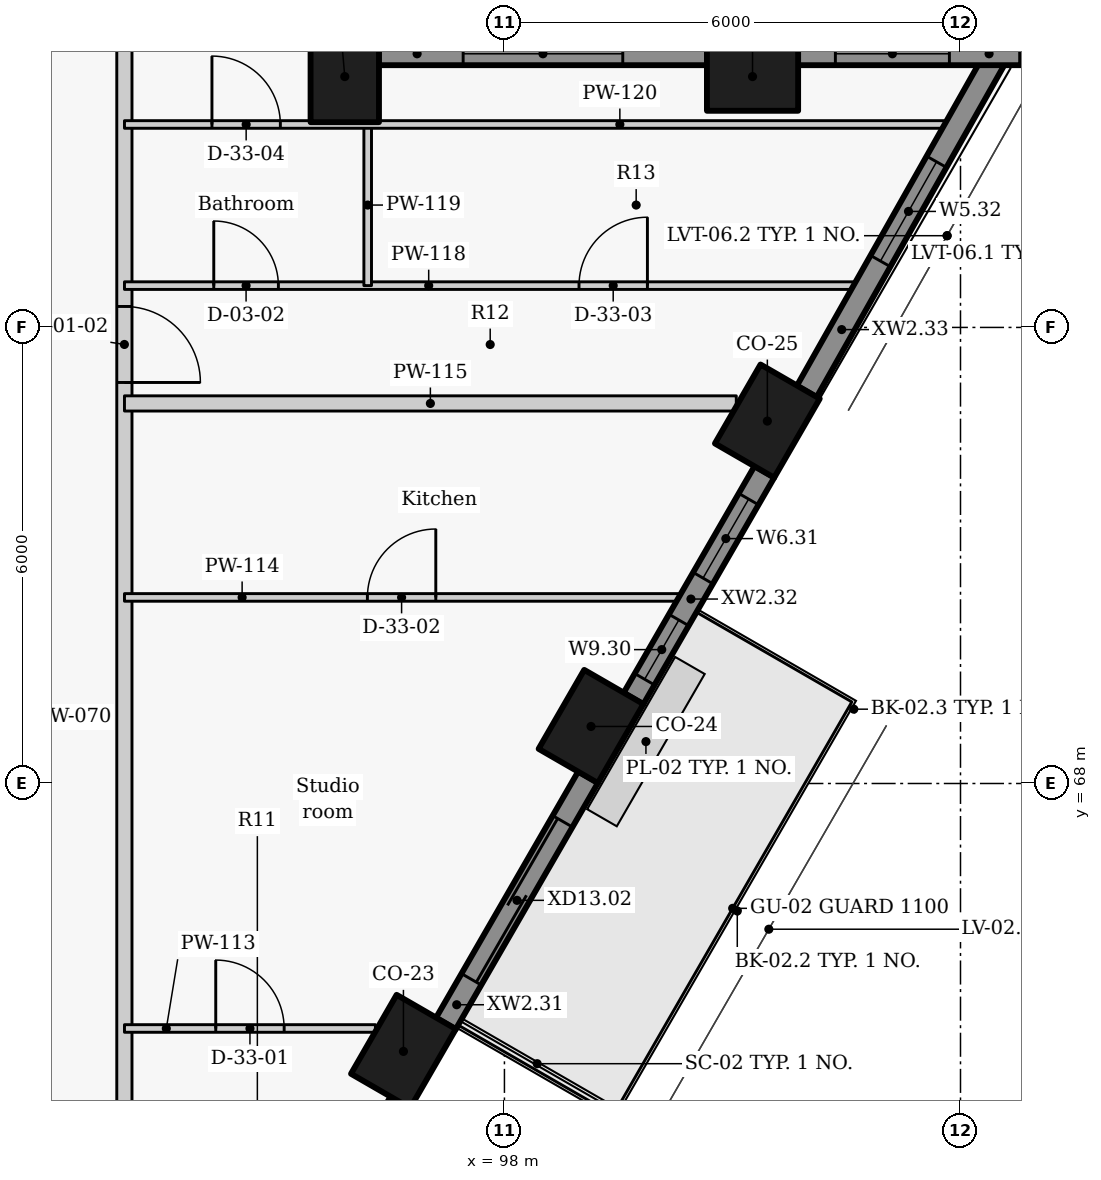
"""IFC4 building model, lengths in metres.
Left out: names, types, materials, properties, quantities, classifications, styles, units other than length and angle.
Written with IfcOpenShell. Run it as: python <this file> out.ifc"""

import sys

from ifc_helpers import new_model, si_unit, direction, frame, frame_2d, origin, origin_2d, place, context, subcontext, project, spatial, rectangle, extrude, element, fill, save


model = new_model("IFC4")
c1 = context("Model", 3, precision=1e-05, world=origin(), true_north=direction((0.0, 1.0)))
c2 = subcontext(c1, "Body", "Model", "MODEL_VIEW")
j1 = project(units=[si_unit("LENGTHUNIT", "METRE"), si_unit("PLANEANGLEUNIT", "RADIAN")], contexts=[c1])
p1 = place(None, origin())
s1 = spatial("IfcSite", under=j1, at=p1, CompositionType="ELEMENT")
p2 = place(p1, origin())
s2 = spatial("IfcBuilding", under=s1, at=p2, CompositionType="ELEMENT")
p3 = place(p2, frame((0.0, 0.0, 193.2)))
s3 = spatial("IfcBuildingStorey", under=s2, at=p3, CompositionType="ELEMENT", Elevation=193.2)
for number, where, z_axis, x_axis in (
    (1, (96.671, 64.475, 0.0), (0.0, 0.0, 1.0), (0.5, 0.866, 0.0)),
    (2, (99.139, 68.75, 0.0), (0.0, 0.0, 1.0), (0.5, 0.866, 0.0)),
    (3, (101.459, 72.768, 0.0), (0.0, 0.0, 1.0), (0.5, 0.866, 0.0)),
    (4, (101.264, 77.3, 0.0), (0.0, 0.0, 1.0), (-1.0, 0.0, 0.0)),
    (5, (95.899, 77.3, 0.0), (0.0, 0.0, 1.0), (0.0, 1.0, 0.0)),
):
    element("IfcColumn", number, at=place(p3, frame(where, z_axis=z_axis, x_axis=x_axis)), inside=s3, PredefinedType="COLUMN", context=c2, shape_type="SweptSolid", body=[
        extrude(rectangle(XDim=1.2, YDim=0.9, at=origin_2d()), origin(), (0.0, 0.0, 1.0), 3.3),
    ])
p4 = place(p3, frame((94.761, 60.567, 0.0), z_axis=(0.0, 0.0, 1.0), x_axis=(0.499982088007, 0.866035745032, 0.0)))
e6 = element("IfcWall", 6, at=p4, inside=s3, PredefinedType="SOLIDWALL", context=c2, shape_type="SweptSolid", body=[
    extrude(rectangle(XDim=3.744, YDim=0.3, at=frame_2d((1.872, 0.0))), origin(), (0.0, 0.0, 1.0), 2.425),
])
p5 = place(p4, frame((2.319, 0.0, 1.5)))
e7 = element("IfcOpeningElement", 7, at=p5, cuts=e6, PredefinedType="OPENING", context=c2, shape_type="SweptSolid", body=[
    extrude(rectangle(XDim=0.9, YDim=0.5, at=frame_2d((0.45, 0.25))), frame((0.0, 0.16, 0.0), z_axis=(0.0, -1.0, 0.0), x_axis=(1.0, 0.0, 0.0)), (0.0, 0.0, 1.0), 0.32),
])
p6 = place(p3, frame((97.229, 64.842, 0.0), z_axis=(0.0, 0.0, 1.0), x_axis=(0.500059225181, 0.86599120741, 0.0)))
e8 = element("IfcWall", 8, at=p6, inside=s3, PredefinedType="SOLIDWALL", context=c2, shape_type="SweptSolid", body=[
    extrude(rectangle(XDim=3.744, YDim=0.3, at=frame_2d((1.872, 0.0))), origin(), (0.0, 0.0, 1.0), 2.425),
])
p7 = place(p6, frame((0.672, 0.0, 0.0)))
e9 = element("IfcOpeningElement", 9, at=p7, cuts=e8, PredefinedType="OPENING", context=c2, shape_type="SweptSolid", body=[
    extrude(rectangle(XDim=2.4, YDim=2.0, at=frame_2d((1.2, 1.0))), frame((0.0, 0.16, 0.0), z_axis=(0.0, -1.0, 0.0), x_axis=(1.0, 0.0, 0.0)), (0.0, 0.0, 1.0), 0.32),
])
p8 = place(p3, frame((99.697, 69.116, 0.0), z_axis=(0.0, 0.0, 1.0), x_axis=(0.499955427682, 0.866051136095, 0.0)))
e10 = element("IfcWall", 10, at=p8, inside=s3, PredefinedType="SOLIDWALL", context=c2, shape_type="SweptSolid", body=[
    extrude(rectangle(XDim=3.447, YDim=0.3, at=frame_2d((1.724, 0.0))), origin(), (0.0, 0.0, 1.0), 2.425),
])
p9 = place(p8, frame((0.295, 0.0, 0.9)))
e11 = element("IfcOpeningElement", 11, at=p9, cuts=e10, PredefinedType="OPENING", context=c2, shape_type="SweptSolid", body=[
    extrude(rectangle(XDim=0.9, YDim=1.1, at=frame_2d((0.45, 0.55))), frame((0.0, 0.16, 0.0), z_axis=(0.0, -1.0, 0.0), x_axis=(1.0, 0.0, 0.0)), (0.0, 0.0, 1.0), 0.32),
])
p10 = place(p8, frame((1.831, 0.0, 0.9)))
e12 = element("IfcOpeningElement", 12, at=p10, cuts=e10, PredefinedType="OPENING", context=c2, shape_type="SweptSolid", body=[
    extrude(rectangle(XDim=1.2, YDim=1.1, at=frame_2d((0.6, 0.55))), frame((0.0, 0.16, 0.0), z_axis=(0.0, -1.0, 0.0), x_axis=(1.0, 0.0, 0.0)), (0.0, 0.0, 1.0), 0.32),
])
p11 = place(p3, frame((101.977, 73.157, 0.0), z_axis=(0.0, 0.0, 1.0), x_axis=(0.492033360928, 0.870576344575, 0.0)))
e13 = element("IfcWall", 13, at=p11, inside=s3, PredefinedType="SOLIDWALL", context=c2, shape_type="SweptSolid", body=[
    extrude(rectangle(XDim=5.387, YDim=0.3, at=frame_2d((2.693, 0.0))), origin(), (0.0, 0.0, 1.0), 2.425),
])
p12 = place(p11, frame((1.971, 0.0, 0.9)))
e14 = element("IfcOpeningElement", 14, at=p12, cuts=e13, PredefinedType="OPENING", context=c2, shape_type="SweptSolid", body=[
    extrude(rectangle(XDim=1.5, YDim=1.1, at=frame_2d((0.75, 0.55))), frame((0.0, 0.16, 0.0), z_axis=(0.0, -1.0, 0.0), x_axis=(1.0, 0.0, 0.0)), (0.0, 0.0, 1.0), 0.32),
])
p13 = place(p3, frame((104.798, 77.6, 0.0), z_axis=(0.0, 0.0, 1.0), x_axis=(-1.0, 0.0, 0.0)))
e15 = element("IfcWall", 15, at=p13, inside=s3, PredefinedType="SOLIDWALL", context=c2, shape_type="SweptSolid", body=[
    extrude(rectangle(XDim=2.938, YDim=0.3, at=frame_2d((1.469, 0.0))), origin(), (0.0, 0.0, 1.0), 2.425),
])
p14 = place(p13, frame((0.944, 0.0, 0.9)))
e16 = element("IfcOpeningElement", 16, at=p14, cuts=e15, PredefinedType="OPENING", context=c2, shape_type="SweptSolid", body=[
    extrude(rectangle(XDim=1.5, YDim=1.1, at=frame_2d((0.75, 0.55))), frame((0.0, 0.16, 0.0), z_axis=(0.0, -1.0, 0.0), x_axis=(1.0, 0.0, 0.0)), (0.0, 0.0, 1.0), 0.32),
])
p15 = place(p3, frame((100.668, 77.6, 0.0), z_axis=(0.0, 0.0, 1.0), x_axis=(-1.0, 0.0, 0.0)))
e17 = element("IfcWall", 17, at=p15, inside=s3, PredefinedType="SOLIDWALL", context=c2, shape_type="SweptSolid", body=[
    extrude(rectangle(XDim=4.323, YDim=0.3, at=frame_2d((2.161, 0.0))), origin(), (0.0, 0.0, 1.0), 2.425),
])
p16 = place(p15, frame((1.111, 0.0, 0.9)))
e18 = element("IfcOpeningElement", 18, at=p16, cuts=e17, PredefinedType="OPENING", context=c2, shape_type="SweptSolid", body=[
    extrude(rectangle(XDim=2.1, YDim=1.1, at=frame_2d((1.05, 0.55))), frame((0.0, 0.16, 0.0), z_axis=(0.0, -1.0, 0.0), x_axis=(1.0, 0.0, 0.0)), (0.0, 0.0, 1.0), 0.32),
])
p17 = place(p3, frame((93.0, 101.281, 0.0), z_axis=(0.0, 0.0, 1.0), x_axis=(0.0, -1.0, 0.0)))
e19 = element("IfcWall", 19, at=p17, inside=s3, PredefinedType="PARTITIONING", context=c2, shape_type="SweptSolid", body=[
    extrude(rectangle(XDim=42.606, YDim=0.2, at=frame_2d((21.303, 0.0))), origin(), (0.0, 0.0, 1.0), 2.405),
])
p18 = place(p17, frame((39.33, 0.0, 0.0)))
e20 = element("IfcOpeningElement", 20, at=p18, cuts=e19, PredefinedType="OPENING", context=c2, shape_type="SweptSolid", body=[
    extrude(rectangle(XDim=1.0, YDim=2.1, at=frame_2d((0.5, 1.05))), frame((0.0, 0.11, 0.0), z_axis=(0.0, -1.0, 0.0), x_axis=(1.0, 0.0, 0.0)), (0.0, 0.0, 1.0), 0.22),
])
p19 = place(p17, frame((27.005, 0.0, 0.0)))
e21 = element("IfcOpeningElement", 21, at=p19, cuts=e19, PredefinedType="OPENING", context=c2, shape_type="SweptSolid", body=[
    extrude(rectangle(XDim=1.0, YDim=2.1, at=frame_2d((0.5, 1.05))), frame((0.0, 0.11, 0.0), z_axis=(0.0, -1.0, 0.0), x_axis=(1.0, 0.0, 0.0)), (0.0, 0.0, 1.0), 0.22),
])
p20 = place(p17, frame((9.168, 0.0, 0.0)))
e22 = element("IfcOpeningElement", 22, at=p20, cuts=e19, PredefinedType="OPENING", context=c2, shape_type="SweptSolid", body=[
    extrude(rectangle(XDim=1.0, YDim=2.1, at=frame_2d((0.5, 1.05))), frame((0.0, 0.11, 0.0), z_axis=(0.0, -1.0, 0.0), x_axis=(1.0, 0.0, 0.0)), (0.0, 0.0, 1.0), 0.22),
])
p21 = place(p17, frame((3.937, 0.0, 0.0)))
e23 = element("IfcOpeningElement", 23, at=p21, cuts=e19, PredefinedType="OPENING", context=c2, shape_type="SweptSolid", body=[
    extrude(rectangle(XDim=1.0, YDim=2.1, at=frame_2d((0.5, 1.05))), frame((0.0, 0.11, 0.0), z_axis=(0.0, -1.0, 0.0), x_axis=(1.0, 0.0, 0.0)), (0.0, 0.0, 1.0), 0.22),
])
p22 = place(p3, frame((93.001, 64.777, 0.0), z_axis=(0.0, 0.0, 1.0), x_axis=(1.0, 0.0, 0.0)))
e24 = element("IfcWall", 24, at=p22, inside=s3, PredefinedType="PARTITIONING", context=c2, shape_type="SweptSolid", body=[
    extrude(rectangle(XDim=3.302, YDim=0.1, at=frame_2d((1.651, 0.0))), origin(), (0.0, 0.0, 1.0), 3.025),
])
p23 = place(p22, frame((1.201, 0.0, 0.0)))
e25 = element("IfcOpeningElement", 25, at=p23, cuts=e24, PredefinedType="OPENING", context=c2, shape_type="SweptSolid", body=[
    extrude(rectangle(XDim=0.9, YDim=2.1, at=frame_2d((0.45, 1.05))), frame((0.0, 0.06, 0.0), z_axis=(0.0, -1.0, 0.0), x_axis=(1.0, 0.0, 0.0)), (0.0, 0.0, 1.0), 0.12),
])
p24 = place(p3, frame((93.001, 70.448, 0.0), z_axis=(0.0, 0.0, 1.0), x_axis=(1.0, 0.0, 0.0)))
e26 = element("IfcWall", 26, at=p24, inside=s3, PredefinedType="PARTITIONING", context=c2, shape_type="SweptSolid", body=[
    extrude(rectangle(XDim=7.292, YDim=0.1, at=frame_2d((3.646, 0.0))), origin(), (0.0, 0.0, 1.0), 2.405),
])
p25 = place(p24, frame((3.196, 0.0, 0.0)))
e27 = element("IfcOpeningElement", 27, at=p25, cuts=e26, PredefinedType="OPENING", context=c2, shape_type="SweptSolid", body=[
    extrude(rectangle(XDim=0.9, YDim=2.1, at=frame_2d((0.45, 1.05))), frame((0.0, 0.06, 0.0), z_axis=(0.0, -1.0, 0.0), x_axis=(1.0, 0.0, 0.0)), (0.0, 0.0, 1.0), 0.12),
])
p26 = place(p3, frame((93.001, 73.0, 0.0), z_axis=(0.0, 0.0, 1.0), x_axis=(1.0, 0.0, 0.0)))
e28 = element("IfcWall", 28, at=p26, inside=s3, PredefinedType="PARTITIONING", context=c2, shape_type="SweptSolid", body=[
    extrude(rectangle(XDim=8.049, YDim=0.2, at=frame_2d((4.025, 0.0))), origin(), (0.0, 0.0, 1.0), 3.025),
])
p27 = place(p3, frame((93.001, 74.55, 0.0), z_axis=(0.0, 0.0, 1.0), x_axis=(1.0, 0.0, 0.0)))
e29 = element("IfcWall", 29, at=p27, inside=s3, PredefinedType="PARTITIONING", context=c2, shape_type="SweptSolid", body=[
    extrude(rectangle(XDim=9.66, YDim=0.1, at=frame_2d((4.83, 0.0))), origin(), (0.0, 0.0, 1.0), 2.405),
])
p28 = place(p27, frame((1.175, 0.0, 0.0)))
e30 = element("IfcOpeningElement", 30, at=p28, cuts=e29, PredefinedType="OPENING", context=c2, shape_type="SweptSolid", body=[
    extrude(rectangle(XDim=0.85, YDim=2.1, at=frame_2d((0.425, 1.05))), frame((0.0, 0.06, 0.0), z_axis=(0.0, -1.0, 0.0), x_axis=(1.0, 0.0, 0.0)), (0.0, 0.0, 1.0), 0.12),
])
p29 = place(p27, frame((5.98, 0.0, 0.0)))
e31 = element("IfcOpeningElement", 31, at=p29, cuts=e29, PredefinedType="OPENING", context=c2, shape_type="SweptSolid", body=[
    extrude(rectangle(XDim=0.9, YDim=2.1, at=frame_2d((0.45, 1.05))), frame((0.0, 0.06, 0.0), z_axis=(0.0, -1.0, 0.0), x_axis=(1.0, 0.0, 0.0)), (0.0, 0.0, 1.0), 0.12),
])
p30 = place(p3, frame((96.201, 74.55, 0.0), z_axis=(0.0, 0.0, 1.0), x_axis=(0.0, 1.0, 0.0)))
e32 = element("IfcWall", 32, at=p30, inside=s3, PredefinedType="PARTITIONING", context=c2, shape_type="SweptSolid", body=[
    extrude(rectangle(XDim=2.12, YDim=0.1, at=frame_2d((1.06, 0.0))), origin(), (0.0, 0.0, 1.0), 3.025),
])
p31 = place(p3, frame((93.001, 76.67, 0.0), z_axis=(0.0, 0.0, 1.0), x_axis=(1.0, 0.0, 0.0)))
e33 = element("IfcWall", 33, at=p31, inside=s3, PredefinedType="PARTITIONING", context=c2, shape_type="SweptSolid", body=[
    extrude(rectangle(XDim=10.884, YDim=0.1, at=frame_2d((5.442, 0.0))), origin(), (0.0, 0.0, 1.0), 2.405),
])
p32 = place(p31, frame((1.151, 0.0, 0.0)))
e34 = element("IfcOpeningElement", 34, at=p32, cuts=e33, PredefinedType="OPENING", context=c2, shape_type="SweptSolid", body=[
    extrude(rectangle(XDim=0.9, YDim=2.1, at=frame_2d((0.45, 1.05))), frame((0.0, 0.06, 0.0), z_axis=(0.0, -1.0, 0.0), x_axis=(1.0, 0.0, 0.0)), (0.0, 0.0, 1.0), 0.12),
])
p33 = place(p7, origin())
e35 = element("IfcDoor", 35, at=p33, inside=s3, OperationType="DOUBLE_DOOR_SLIDING", PredefinedType="DOOR", context=c2, shape_type="SweptSolid", body=[
    extrude(rectangle(XDim=2.4, YDim=2.0, at=frame_2d((1.2, 1.0))), frame((0.0, 0.025, 0.0), z_axis=(0.0, -1.0, 0.0), x_axis=(1.0, 0.0, 0.0)), (0.0, 0.0, 1.0), 0.05),
])
fill(e9, e35)
p34 = place(p9, origin())
e36 = element("IfcWindow", 36, at=p34, inside=s3, PartitioningType="SINGLE_PANEL", PredefinedType="WINDOW", context=c2, shape_type="SweptSolid", body=[
    extrude(rectangle(XDim=0.9, YDim=1.1, at=frame_2d((0.45, 0.55))), frame((0.0, 0.03, 0.0), z_axis=(0.0, -1.0, 0.0), x_axis=(1.0, 0.0, 0.0)), (0.0, 0.0, 1.0), 0.06),
])
fill(e11, e36)
p35 = place(p10, origin())
e37 = element("IfcWindow", 37, at=p35, inside=s3, PartitioningType="SINGLE_PANEL", PredefinedType="WINDOW", context=c2, shape_type="SweptSolid", body=[
    extrude(rectangle(XDim=1.2, YDim=1.1, at=frame_2d((0.6, 0.55))), frame((0.0, 0.03, 0.0), z_axis=(0.0, -1.0, 0.0), x_axis=(1.0, 0.0, 0.0)), (0.0, 0.0, 1.0), 0.06),
])
fill(e12, e37)
p36 = place(p12, origin())
e38 = element("IfcWindow", 38, at=p36, inside=s3, PartitioningType="SINGLE_PANEL", PredefinedType="WINDOW", context=c2, shape_type="SweptSolid", body=[
    extrude(rectangle(XDim=1.5, YDim=1.1, at=frame_2d((0.75, 0.55))), frame((0.0, 0.03, 0.0), z_axis=(0.0, -1.0, 0.0), x_axis=(1.0, 0.0, 0.0)), (0.0, 0.0, 1.0), 0.06),
])
fill(e14, e38)
p37 = place(p14, origin())
e39 = element("IfcWindow", 39, at=p37, inside=s3, PartitioningType="SINGLE_PANEL", PredefinedType="WINDOW", context=c2, shape_type="SweptSolid", body=[
    extrude(rectangle(XDim=1.5, YDim=1.1, at=frame_2d((0.75, 0.55))), frame((0.0, 0.03, 0.0), z_axis=(0.0, -1.0, 0.0), x_axis=(1.0, 0.0, 0.0)), (0.0, 0.0, 1.0), 0.06),
])
fill(e16, e39)
p38 = place(p16, origin())
e40 = element("IfcWindow", 40, at=p38, inside=s3, PartitioningType="SINGLE_PANEL", PredefinedType="WINDOW", context=c2, shape_type="SweptSolid", body=[
    extrude(rectangle(XDim=2.1, YDim=1.1, at=frame_2d((1.05, 0.55))), frame((0.0, 0.03, 0.0), z_axis=(0.0, -1.0, 0.0), x_axis=(1.0, 0.0, 0.0)), (0.0, 0.0, 1.0), 0.06),
])
fill(e18, e40)
p39 = place(p23, origin())
e41 = element("IfcDoor", 41, at=p39, inside=s3, OperationType="SINGLE_SWING_LEFT", PredefinedType="DOOR", context=c2, shape_type="SweptSolid", body=[
    extrude(rectangle(XDim=0.9, YDim=2.1, at=frame_2d((0.45, 1.05))), frame((0.0, 0.025, 0.0), z_axis=(0.0, -1.0, 0.0), x_axis=(1.0, 0.0, 0.0)), (0.0, 0.0, 1.0), 0.05),
])
fill(e25, e41)
p40 = place(p25, origin())
e42 = element("IfcDoor", 42, at=p40, inside=s3, OperationType="SINGLE_SWING_RIGHT", PredefinedType="DOOR", context=c2, shape_type="SweptSolid", body=[
    extrude(rectangle(XDim=0.9, YDim=2.1, at=frame_2d((0.45, 1.05))), frame((0.0, 0.025, 0.0), z_axis=(0.0, -1.0, 0.0), x_axis=(1.0, 0.0, 0.0)), (0.0, 0.0, 1.0), 0.05),
])
fill(e27, e42)
p41 = place(p19, origin())
e43 = element("IfcDoor", 43, at=p41, inside=s3, OperationType="SINGLE_SWING_RIGHT", PredefinedType="DOOR", context=c2, shape_type="SweptSolid", body=[
    extrude(rectangle(XDim=1.0, YDim=2.1, at=frame_2d((0.5, 1.05))), frame((0.0, 0.025, 0.0), z_axis=(0.0, -1.0, 0.0), x_axis=(1.0, 0.0, 0.0)), (0.0, 0.0, 1.0), 0.05),
])
fill(e21, e43)
p42 = place(p28, origin())
e44 = element("IfcDoor", 44, at=p42, inside=s3, OperationType="SINGLE_SWING_LEFT", PredefinedType="DOOR", context=c2, shape_type="SweptSolid", body=[
    extrude(rectangle(XDim=0.85, YDim=2.1, at=frame_2d((0.425, 1.05))), frame((0.0, 0.025, 0.0), z_axis=(0.0, -1.0, 0.0), x_axis=(1.0, 0.0, 0.0)), (0.0, 0.0, 1.0), 0.05),
])
fill(e30, e44)
p43 = place(p29, origin())
e45 = element("IfcDoor", 45, at=p43, inside=s3, OperationType="SINGLE_SWING_RIGHT", PredefinedType="DOOR", context=c2, shape_type="SweptSolid", body=[
    extrude(rectangle(XDim=0.9, YDim=2.1, at=frame_2d((0.45, 1.05))), frame((0.0, 0.025, 0.0), z_axis=(0.0, -1.0, 0.0), x_axis=(1.0, 0.0, 0.0)), (0.0, 0.0, 1.0), 0.05),
])
fill(e31, e45)
p44 = place(p32, origin())
e46 = element("IfcDoor", 46, at=p44, inside=s3, OperationType="SINGLE_SWING_LEFT", PredefinedType="DOOR", context=c2, shape_type="SweptSolid", body=[
    extrude(rectangle(XDim=0.9, YDim=2.1, at=frame_2d((0.45, 1.05))), frame((0.0, 0.025, 0.0), z_axis=(0.0, -1.0, 0.0), x_axis=(1.0, 0.0, 0.0)), (0.0, 0.0, 1.0), 0.05),
])
fill(e34, e46)
save(model, sys.argv[1])
